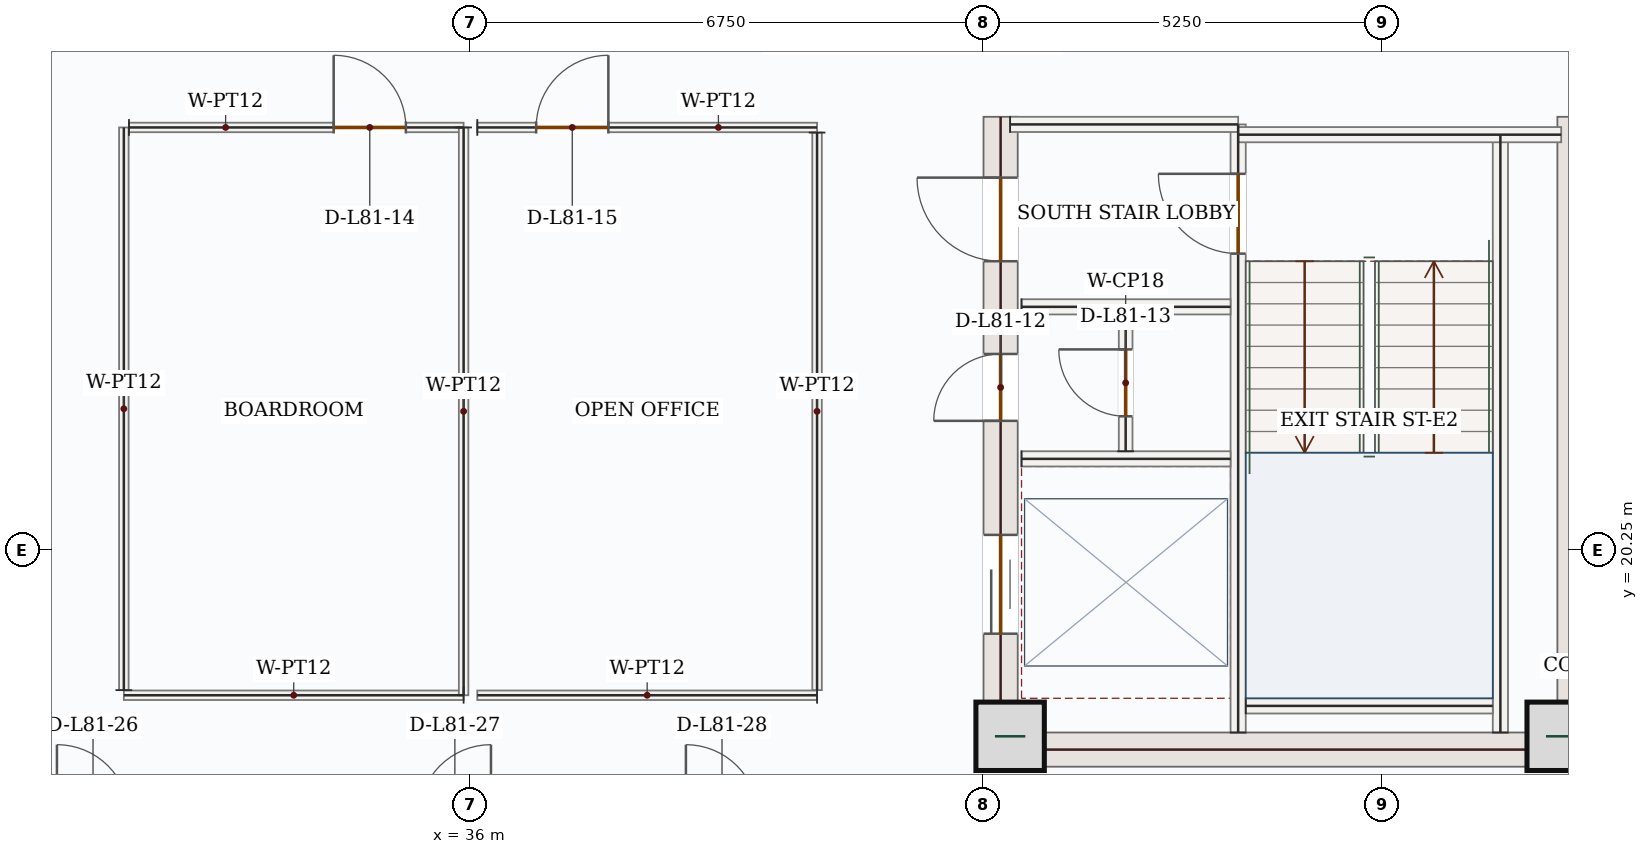
"""IFC4 building model, lengths in metres.
Left out: names, types, materials, properties, quantities, classifications, styles, units other than length and angle.
Written with IfcOpenShell. Run it as: python <this file> out.ifc"""

import sys

from ifc_helpers import new_model, si_unit, direction, frame, frame_2d, origin, origin_2d, place, context, subcontext, project, spatial, rectangle, extrude, source, transform, mapped, element, fill, save


model = new_model("IFC4")
c1 = context("Model", 3, precision=1e-05, world=origin(), true_north=direction((0.0, 1.0)))
c2 = subcontext(c1, "Body", "Model", "MODEL_VIEW")
j1 = project(units=[si_unit("LENGTHUNIT", "METRE"), si_unit("PLANEANGLEUNIT", "RADIAN")], contexts=[c1])
p1 = place(None, origin())
s1 = spatial("IfcSite", under=j1, at=p1, CompositionType="ELEMENT")
p2 = place(p1, origin())
s2 = spatial("IfcBuilding", under=s1, at=p2, CompositionType="ELEMENT")
p3 = place(p2, frame((0.0, 0.0, 334.8)))
s3 = spatial("IfcBuildingStorey", under=s2, at=p3, CompositionType="ELEMENT", Elevation=334.8)
p4 = place(p3, frame((42.975, 17.4, 0.0), z_axis=(0.0, 0.0, 1.0), x_axis=(0.0, 1.0, 0.0)))
e1 = element("IfcWall", 1, at=p4, inside=s3, PredefinedType="SHEAR", context=c2, shape_type="SweptSolid", body=[
    extrude(rectangle(XDim=8.55, YDim=0.45, at=frame_2d((4.275, 0.0))), origin(), (0.0, 0.0, 1.0), 3.5),
])
p5 = place(p4, frame((6.65, 0.0, 0.0)))
e2 = element("IfcOpeningElement", 2, at=p5, cuts=e1, PredefinedType="OPENING", context=c2, shape_type="SweptSolid", body=[
    extrude(rectangle(XDim=1.1, YDim=2.2, at=frame_2d((0.55, 1.1))), frame((0.0, 0.235, 0.0), z_axis=(0.0, -1.0, 0.0), x_axis=(1.0, 0.0, 0.0)), (0.0, 0.0, 1.0), 0.47),
])
p6 = place(p4, frame((1.75, 0.0, 0.0)))
e3 = element("IfcOpeningElement", 3, at=p6, cuts=e1, PredefinedType="OPENING", context=c2, shape_type="SweptSolid", body=[
    extrude(rectangle(XDim=1.3, YDim=2.2, at=frame_2d((0.65, 1.1))), frame((0.0, 0.235, 0.0), z_axis=(0.0, -1.0, 0.0), x_axis=(1.0, 0.0, 0.0)), (0.0, 0.0, 1.0), 0.47),
])
p7 = place(p4, frame((4.55, 0.0, 0.0)))
e4 = element("IfcOpeningElement", 4, at=p7, cuts=e1, PredefinedType="OPENING", context=c2, shape_type="SweptSolid", body=[
    extrude(rectangle(XDim=0.88, YDim=2.1, at=frame_2d((0.44, 1.05))), frame((0.0, 0.235, 0.0), z_axis=(0.0, -1.0, 0.0), x_axis=(1.0, 0.0, 0.0)), (0.0, 0.0, 1.0), 0.47),
])
m1 = source(origin(), c2, "Body", "SweptSolid", [
    extrude(rectangle(XDim=8.55, YDim=0.45, at=frame_2d((4.275, 0.0))), origin(), (0.0, 0.0, 1.0), 3.5),
])
p8 = place(p3, frame((50.525, 17.4, 0.0), z_axis=(0.0, 0.0, 1.0), x_axis=(0.0, 1.0, 0.0)))
e5 = element("IfcWall", 5, at=p8, inside=s3, PredefinedType="SHEAR", context=c2, shape_type="MappedRepresentation", body=[
    mapped(m1, transform((0.0, 0.0, 0.0), x_axis=(1.0, 0.0, 0.0), y_axis=(0.0, 1.0, 0.0), z_axis=(0.0, 0.0, 1.0), scale=1.0)),
])
m2 = source(origin(), c2, "Body", "SweptSolid", [
    extrude(rectangle(XDim=7.1, YDim=0.45, at=frame_2d((3.55, 0.0))), origin(), (0.0, 0.0, 1.0), 3.5),
])
p9 = place(p3, frame((43.2, 17.625, 0.0), z_axis=(0.0, 0.0, 1.0), x_axis=(1.0, 0.0, 0.0)))
e6 = element("IfcWall", 6, at=p9, inside=s3, PredefinedType="SHEAR", context=c2, shape_type="MappedRepresentation", body=[
    mapped(m2, transform((0.0, 0.0, 0.0), x_axis=(1.0, 0.0, 0.0), y_axis=(0.0, 1.0, 0.0), z_axis=(0.0, 0.0, 1.0), scale=1.0)),
])
m3 = source(origin(), c2, "Body", "SweptSolid", [
    extrude(rectangle(XDim=0.9, YDim=0.9, at=origin_2d()), origin(), (0.0, 0.0, 1.0), 3.75),
])
for number, where, z_axis, x_axis in (
    (7, (43.1, 17.8, 0.0), (0.0, 0.0, 1.0), (1.0, 0.0, 0.0)),
    (8, (50.35, 17.8, 0.0), (0.0, 0.0, 1.0), (1.0, 0.0, 0.0)),
):
    element("IfcColumn", number, at=place(p3, frame(where, z_axis=z_axis, x_axis=x_axis)), inside=s3, PredefinedType="COLUMN", context=c2, shape_type="MappedRepresentation", body=[
        mapped(m3, transform((0.0, 0.0, 0.0), x_axis=(1.0, 0.0, 0.0), y_axis=(0.0, 1.0, 0.0), z_axis=(0.0, 0.0, 1.0), scale=1.0)),
    ])
m4 = source(origin(), c2, "Body", "SweptSolid", [
    extrude(rectangle(XDim=3.709, YDim=0.28, at=frame_2d((1.855, 0.0))), origin(), (0.0, 0.0, 1.0), 3.5),
])
p10 = place(p3, frame((53.06, 18.458, 0.0), z_axis=(0.0, 0.0, 1.0), x_axis=(-0.707106781187, -0.707106781187, 0.0)))
e9 = element("IfcWall", 9, at=p10, inside=s3, PredefinedType="SOLIDWALL", context=c2, shape_type="MappedRepresentation", body=[
    mapped(m4, transform((0.0, 0.0, 0.0), x_axis=(1.0, 0.0, 0.0), y_axis=(0.0, 1.0, 0.0), z_axis=(0.0, 0.0, 1.0), scale=1.0)),
])
m5 = source(origin(), c2, "Body", "SweptSolid", [
    extrude(rectangle(XDim=7.87, YDim=0.2, at=frame_2d((3.935, 0.0))), origin(), (0.0, 0.0, 1.0), 3.5),
])
p11 = place(p3, frame((49.55, 17.85, 0.0), z_axis=(0.0, 0.0, 1.0), x_axis=(0.0, 1.0, 0.0)))
e10 = element("IfcWall", 10, at=p11, inside=s3, PredefinedType="SOLIDWALL", context=c2, shape_type="MappedRepresentation", body=[
    mapped(m5, transform((0.0, 0.0, 0.0), x_axis=(1.0, 0.0, 0.0), y_axis=(0.0, 1.0, 0.0), z_axis=(0.0, 0.0, 1.0), scale=1.0)),
])
p12 = place(p3, frame((46.1, 17.85, 0.0), z_axis=(0.0, 0.0, 1.0), x_axis=(0.0, 1.0, 0.0)))
e11 = element("IfcWall", 11, at=p12, inside=s3, PredefinedType="SOLIDWALL", context=c2, shape_type="SweptSolid", body=[
    extrude(rectangle(XDim=8.0, YDim=0.2, at=frame_2d((4.0, 0.0))), origin(), (0.0, 0.0, 1.0), 3.5),
])
p13 = place(p12, frame((6.3, 0.0, 0.0)))
e12 = element("IfcOpeningElement", 12, at=p13, cuts=e11, PredefinedType="OPENING", context=c2, shape_type="SweptSolid", body=[
    extrude(rectangle(XDim=1.05, YDim=2.15, at=frame_2d((0.525, 1.075))), frame((0.0, 0.11, 0.0), z_axis=(0.0, -1.0, 0.0), x_axis=(1.0, 0.0, 0.0)), (0.0, 0.0, 1.0), 0.22),
])
m6 = source(origin(), c2, "Body", "SweptSolid", [
    extrude(rectangle(XDim=3.0, YDim=0.2, at=frame_2d((1.5, 0.0))), origin(), (0.0, 0.0, 1.0), 3.5),
])
p14 = place(p3, frame((43.1, 25.85, 0.0), z_axis=(0.0, 0.0, 1.0), x_axis=(1.0, 0.0, 0.0)))
e13 = element("IfcWall", 13, at=p14, inside=s3, PredefinedType="SOLIDWALL", context=c2, shape_type="MappedRepresentation", body=[
    mapped(m6, transform((0.0, 0.0, 0.0), x_axis=(1.0, 0.0, 0.0), y_axis=(0.0, 1.0, 0.0), z_axis=(0.0, 0.0, 1.0), scale=1.0)),
])
m7 = source(origin(), c2, "Body", "SweptSolid", [
    extrude(rectangle(XDim=4.25, YDim=0.2, at=frame_2d((2.125, 0.0))), origin(), (0.0, 0.0, 1.0), 3.5),
])
p15 = place(p3, frame((46.1, 25.715, 0.0), z_axis=(0.0, 0.0, 1.0), x_axis=(1.0, 0.0, 0.0)))
e14 = element("IfcWall", 14, at=p15, inside=s3, PredefinedType="SOLIDWALL", context=c2, shape_type="MappedRepresentation", body=[
    mapped(m7, transform((0.0, 0.0, 0.0), x_axis=(1.0, 0.0, 0.0), y_axis=(0.0, 1.0, 0.0), z_axis=(0.0, 0.0, 1.0), scale=1.0)),
])
m8 = source(origin(), c2, "Body", "SweptSolid", [
    extrude(rectangle(XDim=3.25, YDim=0.2, at=frame_2d((1.625, 0.0))), origin(), (0.0, 0.0, 1.0), 3.5),
])
p16 = place(p3, frame((46.2, 18.2, 0.0), z_axis=(0.0, 0.0, 1.0), x_axis=(1.0, 0.0, 0.0)))
e15 = element("IfcWall", 15, at=p16, inside=s3, PredefinedType="SOLIDWALL", context=c2, shape_type="MappedRepresentation", body=[
    mapped(m8, transform((0.0, 0.0, 0.0), x_axis=(1.0, 0.0, 0.0), y_axis=(0.0, 1.0, 0.0), z_axis=(0.0, 0.0, 1.0), scale=1.0)),
])
m9 = source(origin(), c2, "Body", "SweptSolid", [
    extrude(rectangle(XDim=2.75, YDim=0.2, at=frame_2d((1.375, 0.0))), origin(), (0.0, 0.0, 1.0), 3.5),
])
for number, where, z_axis, x_axis in (
    (16, (43.25, 23.45, 0.0), (0.0, 0.0, 1.0), (1.0, 0.0, 0.0)),
    (17, (43.25, 21.45, 0.0), (0.0, 0.0, 1.0), (1.0, 0.0, 0.0)),
):
    element("IfcWall", number, at=place(p3, frame(where, z_axis=z_axis, x_axis=x_axis)), inside=s3, PredefinedType="SOLIDWALL", context=c2, shape_type="MappedRepresentation", body=[
        mapped(m9, transform((0.0, 0.0, 0.0), x_axis=(1.0, 0.0, 0.0), y_axis=(0.0, 1.0, 0.0), z_axis=(0.0, 0.0, 1.0), scale=1.0)),
    ])
p17 = place(p3, frame((44.62, 21.55, 0.0), z_axis=(0.0, 0.0, 1.0), x_axis=(0.0, 1.0, 0.0)))
e18 = element("IfcWall", 18, at=p17, inside=s3, PredefinedType="PARTITIONING", context=c2, shape_type="SweptSolid", body=[
    extrude(rectangle(XDim=1.8, YDim=0.18, at=frame_2d((0.9, 0.0))), origin(), (0.0, 0.0, 1.0), 3.5),
])
p18 = place(p17, frame((0.46, 0.0, 0.0)))
e19 = element("IfcOpeningElement", 19, at=p18, cuts=e18, PredefinedType="OPENING", context=c2, shape_type="SweptSolid", body=[
    extrude(rectangle(XDim=0.88, YDim=2.1, at=frame_2d((0.44, 1.05))), frame((0.0, 0.1, 0.0), z_axis=(0.0, -1.0, 0.0), x_axis=(1.0, 0.0, 0.0)), (0.0, 0.0, 1.0), 0.2),
])
m10 = source(origin(), c2, "Body", "SweptSolid", [
    extrude(rectangle(XDim=4.47, YDim=0.125, at=frame_2d((2.235, 0.0))), origin(), (0.0, 0.0, 1.0), 3.5),
])
p19 = place(p3, frame((35.91, 18.34, 0.0), z_axis=(0.0, 0.0, 1.0), x_axis=(-1.0, 0.0, 0.0)))
e20 = element("IfcWall", 20, at=p19, inside=s3, PredefinedType="PARTITIONING", context=c2, shape_type="MappedRepresentation", body=[
    mapped(m10, transform((0.0, 0.0, 0.0), x_axis=(1.0, 0.0, 0.0), y_axis=(0.0, 1.0, 0.0), z_axis=(0.0, 0.0, 1.0), scale=1.0)),
])
m11 = source(origin(), c2, "Body", "SweptSolid", [
    extrude(rectangle(XDim=7.403, YDim=0.125, at=frame_2d((3.701, 0.0))), origin(), (0.0, 0.0, 1.0), 3.5),
])
p20 = place(p3, frame((31.44, 18.407, 0.0), z_axis=(0.0, 0.0, 1.0), x_axis=(0.0, 1.0, 0.0)))
e21 = element("IfcWall", 21, at=p20, inside=s3, PredefinedType="PARTITIONING", context=c2, shape_type="MappedRepresentation", body=[
    mapped(m11, transform((0.0, 0.0, 0.0), x_axis=(1.0, 0.0, 0.0), y_axis=(0.0, 1.0, 0.0), z_axis=(0.0, 0.0, 1.0), scale=1.0)),
])
p21 = place(p3, frame((31.508, 25.81, 0.0), z_axis=(0.0, 0.0, 1.0), x_axis=(1.0, 0.0, 0.0)))
e22 = element("IfcWall", 22, at=p21, inside=s3, PredefinedType="PARTITIONING", context=c2, shape_type="SweptSolid", body=[
    extrude(rectangle(XDim=4.402, YDim=0.125, at=frame_2d((2.201, 0.0))), origin(), (0.0, 0.0, 1.0), 3.5),
])
p22 = place(p21, frame((2.693, 0.0, 0.0)))
e23 = element("IfcOpeningElement", 23, at=p22, cuts=e22, PredefinedType="OPENING", context=c2, shape_type="SweptSolid", body=[
    extrude(rectangle(XDim=0.95, YDim=2.15, at=frame_2d((0.475, 1.075))), frame((0.0, 0.073, 0.0), z_axis=(0.0, -1.0, 0.0), x_axis=(1.0, 0.0, 0.0)), (0.0, 0.0, 1.0), 0.145),
])
m12 = source(origin(), c2, "Body", "SweptSolid", [
    extrude(rectangle(XDim=7.47, YDim=0.125, at=frame_2d((3.735, 0.0))), origin(), (0.0, 0.0, 1.0), 3.5),
])
p23 = place(p3, frame((35.91, 25.81, 0.0), z_axis=(0.0, 0.0, 1.0), x_axis=(0.0, -1.0, 0.0)))
e24 = element("IfcWall", 24, at=p23, inside=s3, PredefinedType="PARTITIONING", context=c2, shape_type="MappedRepresentation", body=[
    mapped(m12, transform((0.0, 0.0, 0.0), x_axis=(1.0, 0.0, 0.0), y_axis=(0.0, 1.0, 0.0), z_axis=(0.0, 0.0, 1.0), scale=1.0)),
])
p24 = place(p3, frame((40.56, 18.34, 0.0), z_axis=(0.0, 0.0, 1.0), x_axis=(-1.0, 0.0, 0.0)))
e25 = element("IfcWall", 25, at=p24, inside=s3, PredefinedType="PARTITIONING", context=c2, shape_type="MappedRepresentation", body=[
    mapped(m10, transform((0.0, 0.0, 0.0), x_axis=(1.0, 0.0, 0.0), y_axis=(0.0, 1.0, 0.0), z_axis=(0.0, 0.0, 1.0), scale=1.0)),
])
p25 = place(p3, frame((36.09, 25.81, 0.0), z_axis=(0.0, 0.0, 1.0), x_axis=(1.0, 0.0, 0.0)))
e26 = element("IfcWall", 26, at=p25, inside=s3, PredefinedType="PARTITIONING", context=c2, shape_type="SweptSolid", body=[
    extrude(rectangle(XDim=4.47, YDim=0.125, at=frame_2d((2.235, 0.0))), origin(), (0.0, 0.0, 1.0), 3.5),
])
p26 = place(p25, frame((0.774, 0.0, 0.0)))
e27 = element("IfcOpeningElement", 27, at=p26, cuts=e26, PredefinedType="OPENING", context=c2, shape_type="SweptSolid", body=[
    extrude(rectangle(XDim=0.95, YDim=2.15, at=frame_2d((0.475, 1.075))), frame((0.0, 0.073, 0.0), z_axis=(0.0, -1.0, 0.0), x_axis=(1.0, 0.0, 0.0)), (0.0, 0.0, 1.0), 0.145),
])
m13 = source(origin(), c2, "Body", "SweptSolid", [
    extrude(rectangle(XDim=7.335, YDim=0.125, at=frame_2d((3.667, 0.0))), origin(), (0.0, 0.0, 1.0), 3.5),
])
p27 = place(p3, frame((40.56, 25.742, 0.0), z_axis=(0.0, 0.0, 1.0), x_axis=(0.0, -1.0, 0.0)))
e28 = element("IfcWall", 28, at=p27, inside=s3, PredefinedType="PARTITIONING", context=c2, shape_type="MappedRepresentation", body=[
    mapped(m13, transform((0.0, 0.0, 0.0), x_axis=(1.0, 0.0, 0.0), y_axis=(0.0, 1.0, 0.0), z_axis=(0.0, 0.0, 1.0), scale=1.0)),
])
m14 = source(origin(), c2, "Body", "SweptSolid", [
    extrude(rectangle(XDim=1.05, YDim=2.15, at=frame_2d((0.525, 1.075))), frame((0.0, 0.025, 0.0), z_axis=(0.0, -1.0, 0.0), x_axis=(1.0, 0.0, 0.0)), (0.0, 0.0, 1.0), 0.05),
])
p28 = place(p13, origin())
e29 = element("IfcDoor", 29, at=p28, inside=s3, OperationType="SINGLE_SWING_RIGHT", PredefinedType="DOOR", context=c2, shape_type="MappedRepresentation", body=[
    mapped(m14, transform((0.0, 0.0, 0.0), x_axis=(1.0, 0.0, 0.0), y_axis=(0.0, 1.0, 0.0), z_axis=(0.0, 0.0, 1.0), scale=1.0)),
])
fill(e12, e29)
m15 = source(origin(), c2, "Body", "SweptSolid", [
    extrude(rectangle(XDim=1.1, YDim=2.2, at=frame_2d((0.55, 1.1))), frame((0.0, 0.025, 0.0), z_axis=(0.0, -1.0, 0.0), x_axis=(1.0, 0.0, 0.0)), (0.0, 0.0, 1.0), 0.05),
])
p29 = place(p5, origin())
e30 = element("IfcDoor", 30, at=p29, inside=s3, OperationType="SINGLE_SWING_RIGHT", PredefinedType="DOOR", context=c2, shape_type="MappedRepresentation", body=[
    mapped(m15, transform((0.0, 0.0, 0.0), x_axis=(1.0, 0.0, 0.0), y_axis=(0.0, 1.0, 0.0), z_axis=(0.0, 0.0, 1.0), scale=1.0)),
])
fill(e2, e30)
m16 = source(origin(), c2, "Body", "SweptSolid", [
    extrude(rectangle(XDim=1.3, YDim=2.2, at=frame_2d((0.65, 1.1))), frame((0.0, 0.025, 0.0), z_axis=(0.0, -1.0, 0.0), x_axis=(1.0, 0.0, 0.0)), (0.0, 0.0, 1.0), 0.05),
])
p30 = place(p6, origin())
e31 = element("IfcDoor", 31, at=p30, inside=s3, OperationType="DOUBLE_DOOR_SLIDING", PredefinedType="DOOR", context=c2, shape_type="MappedRepresentation", body=[
    mapped(m16, transform((0.0, 0.0, 0.0), x_axis=(1.0, 0.0, 0.0), y_axis=(0.0, 1.0, 0.0), z_axis=(0.0, 0.0, 1.0), scale=1.0)),
])
fill(e3, e31)
m17 = source(origin(), c2, "Body", "SweptSolid", [
    extrude(rectangle(XDim=0.88, YDim=2.1, at=frame_2d((0.44, 1.05))), frame((0.0, 0.025, 0.0), z_axis=(0.0, -1.0, 0.0), x_axis=(1.0, 0.0, 0.0)), (0.0, 0.0, 1.0), 0.05),
])
p31 = place(p7, origin())
e32 = element("IfcDoor", 32, at=p31, inside=s3, OperationType="SINGLE_SWING_LEFT", PredefinedType="DOOR", context=c2, shape_type="MappedRepresentation", body=[
    mapped(m17, transform((0.0, 0.0, 0.0), x_axis=(1.0, 0.0, 0.0), y_axis=(0.0, 1.0, 0.0), z_axis=(0.0, 0.0, 1.0), scale=1.0)),
])
fill(e4, e32)
p32 = place(p18, origin())
e33 = element("IfcDoor", 33, at=p32, inside=s3, OperationType="SINGLE_SWING_RIGHT", PredefinedType="DOOR", context=c2, shape_type="MappedRepresentation", body=[
    mapped(m17, transform((0.0, 0.0, 0.0), x_axis=(1.0, 0.0, 0.0), y_axis=(0.0, 1.0, 0.0), z_axis=(0.0, 0.0, 1.0), scale=1.0)),
])
fill(e19, e33)
m18 = source(origin(), c2, "Body", "SweptSolid", [
    extrude(rectangle(XDim=0.95, YDim=2.15, at=frame_2d((0.475, 1.075))), frame((0.0, 0.025, 0.0), z_axis=(0.0, -1.0, 0.0), x_axis=(1.0, 0.0, 0.0)), (0.0, 0.0, 1.0), 0.05),
])
p33 = place(p22, origin())
e34 = element("IfcDoor", 34, at=p33, inside=s3, OperationType="SINGLE_SWING_LEFT", PredefinedType="DOOR", context=c2, shape_type="MappedRepresentation", body=[
    mapped(m18, transform((0.0, 0.0, 0.0), x_axis=(1.0, 0.0, 0.0), y_axis=(0.0, 1.0, 0.0), z_axis=(0.0, 0.0, 1.0), scale=1.0)),
])
fill(e23, e34)
p34 = place(p26, origin())
e35 = element("IfcDoor", 35, at=p34, inside=s3, OperationType="SINGLE_SWING_RIGHT", PredefinedType="DOOR", context=c2, shape_type="MappedRepresentation", body=[
    mapped(m18, transform((0.0, 0.0, 0.0), x_axis=(1.0, 0.0, 0.0), y_axis=(0.0, 1.0, 0.0), z_axis=(0.0, 0.0, 1.0), scale=1.0)),
])
fill(e27, e35)
save(model, sys.argv[1])
